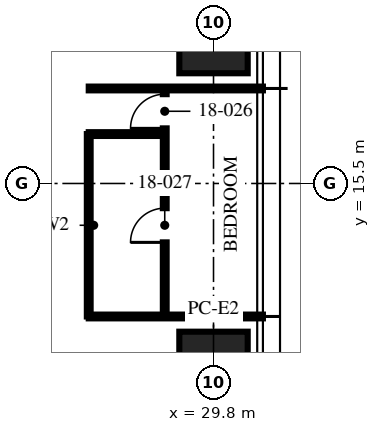
"""IFC4 building model, lengths in metres.
Left out: names, types, materials, properties, quantities, classifications, styles, units other than length and angle.
Written with IfcOpenShell. Run it as: python <this file> out.ifc"""

import sys

from ifc_helpers import new_model, si_unit, direction, frame, frame_2d, origin, origin_2d, place, context, subcontext, project, spatial, rectangle, hollow_rectangle, extrude, element, fill, save


model = new_model("IFC4")
c1 = context("Model", 3, precision=1e-05, world=origin(), true_north=direction((0.0, 1.0)))
c2 = subcontext(c1, "Body", "Model", "MODEL_VIEW")
j1 = project(units=[si_unit("LENGTHUNIT", "METRE"), si_unit("PLANEANGLEUNIT", "RADIAN")], contexts=[c1])
p1 = place(None, origin())
s1 = spatial("IfcSite", under=j1, at=p1, CompositionType="ELEMENT")
p2 = place(p1, origin())
s2 = spatial("IfcBuilding", under=s1, at=p2, CompositionType="ELEMENT")
p3 = place(p2, frame((0.0, 0.0, 73.5)))
s3 = spatial("IfcBuildingStorey", under=s2, at=p3, CompositionType="ELEMENT", Elevation=73.5)
for number, where, z_axis, x_axis in (
    (1, (29.8, 20.0, 0.0), (0.0, 0.0, 1.0), (0.0, 1.0, 0.0)),
    (2, (29.8, 10.0, 0.0), (0.0, 0.0, 1.0), (0.0, 1.0, 0.0)),
):
    element("IfcColumn", number, at=place(p3, frame(where, z_axis=z_axis, x_axis=x_axis)), inside=s3, PredefinedType="COLUMN", context=c2, shape_type="SweptSolid", body=[
        extrude(hollow_rectangle(XDim=3.2, YDim=1.8, WallThickness=0.2, at=origin_2d()), origin(), (0.0, 0.0, 1.0), 3.75),
    ])
for number, where, z_axis, x_axis in (
    (3, (26.517, 12.0, 0.0), (0.0, 0.0, 1.0), (1.0, 0.0, 0.0)),
    (4, (26.517, 18.0, 0.0), (0.0, 0.0, 1.0), (1.0, 0.0, 0.0)),
):
    element("IfcWall", number, at=place(p3, frame(where, z_axis=z_axis, x_axis=x_axis)), inside=s3, PredefinedType="PARTITIONING", context=c2, shape_type="SweptSolid", body=[
        extrude(rectangle(XDim=4.583, YDim=0.1, at=frame_2d((2.292, 0.0))), origin(), (0.0, 0.0, 1.0), 2.71),
    ])
p4 = place(p3, frame((28.517, 12.0, 0.0), z_axis=(0.0, 0.0, 1.0), x_axis=(0.0, 1.0, 0.0)))
e5 = element("IfcWall", 5, at=p4, inside=s3, PredefinedType="PARTITIONING", context=c2, shape_type="SweptSolid", body=[
    extrude(rectangle(XDim=6.0, YDim=0.1, at=frame_2d((3.0, 0.0))), origin(), (0.0, 0.0, 1.0), 2.61),
])
p5 = place(p4, frame((4.95, 0.0, 0.0)))
e6 = element("IfcOpeningElement", 6, at=p5, cuts=e5, PredefinedType="OPENING", context=c2, shape_type="SweptSolid", body=[
    extrude(rectangle(XDim=0.9, YDim=2.1, at=frame_2d((0.45, 1.05))), frame((0.0, 0.06, 0.0), z_axis=(0.0, -1.0, 0.0), x_axis=(1.0, 0.0, 0.0)), (0.0, 0.0, 1.0), 0.12),
])
p6 = place(p4, frame((1.95, 0.0, 0.0)))
e7 = element("IfcOpeningElement", 7, at=p6, cuts=e5, PredefinedType="OPENING", context=c2, shape_type="SweptSolid", body=[
    extrude(rectangle(XDim=0.9, YDim=2.1, at=frame_2d((0.45, 1.05))), frame((0.0, 0.06, 0.0), z_axis=(0.0, -1.0, 0.0), x_axis=(1.0, 0.0, 0.0)), (0.0, 0.0, 1.0), 0.12),
])
p7 = place(p3, frame((26.517, 16.8, 0.0), z_axis=(0.0, 0.0, 1.0), x_axis=(1.0, 0.0, 0.0)))
e8 = element("IfcWall", 8, at=p7, inside=s3, PredefinedType="PARTITIONING", context=c2, shape_type="SweptSolid", body=[
    extrude(rectangle(XDim=2.0, YDim=0.1, at=frame_2d((1.0, 0.0))), origin(), (0.0, 0.0, 1.0), 3.5),
])
p8 = place(p3, frame((26.517, 12.0, 0.0), z_axis=(0.0, 0.0, 1.0), x_axis=(0.0, 1.0, 0.0)))
e9 = element("IfcWall", 9, at=p8, inside=s3, PredefinedType="PARTITIONING", context=c2, shape_type="SweptSolid", body=[
    extrude(rectangle(XDim=4.8, YDim=0.1, at=frame_2d((2.4, 0.0))), origin(), (0.0, 0.0, 1.0), 2.61),
])
p9 = place(p5, origin())
e10 = element("IfcDoor", 10, at=p9, inside=s3, OperationType="SINGLE_SWING_LEFT", PredefinedType="DOOR", context=c2, shape_type="SweptSolid", body=[
    extrude(rectangle(XDim=0.9, YDim=2.1, at=frame_2d((0.45, 1.05))), frame((0.0, 0.025, 0.0), z_axis=(0.0, -1.0, 0.0), x_axis=(1.0, 0.0, 0.0)), (0.0, 0.0, 1.0), 0.05),
])
fill(e6, e10)
p10 = place(p6, origin())
e11 = element("IfcDoor", 11, at=p10, inside=s3, OperationType="SINGLE_SWING_LEFT", PredefinedType="DOOR", context=c2, shape_type="SweptSolid", body=[
    extrude(rectangle(XDim=0.9, YDim=2.1, at=frame_2d((0.45, 1.05))), frame((0.0, 0.025, 0.0), z_axis=(0.0, -1.0, 0.0), x_axis=(1.0, 0.0, 0.0)), (0.0, 0.0, 1.0), 0.05),
])
fill(e7, e11)
save(model, sys.argv[1])
